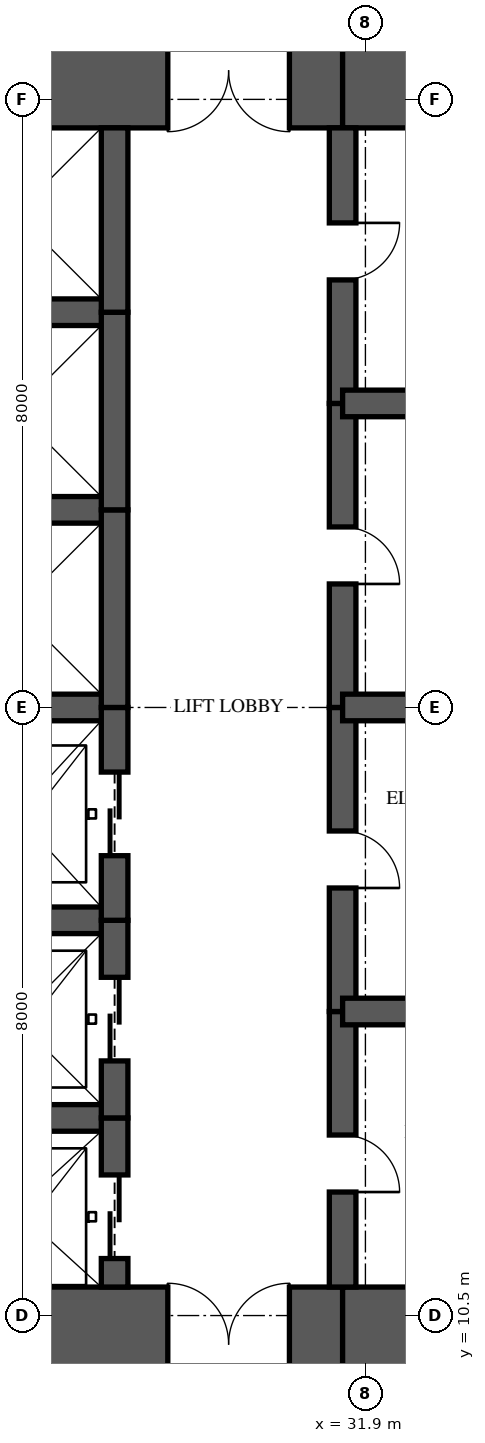
"""IFC4 building model, lengths in metres.
Left out: names, types, materials, properties, quantities, classifications, styles, units other than length and angle.
Written with IfcOpenShell. Run it as: python <this file> out.ifc"""

import sys

from ifc_helpers import new_model, si_unit, direction, frame, frame_2d, origin, place, context, subcontext, project, spatial, rectangle, extrude, element, fill, save


model = new_model("IFC4")
c1 = context("Model", 3, precision=1e-05, world=origin(), true_north=direction((0.0, 1.0)))
c2 = subcontext(c1, "Body", "Model", "MODEL_VIEW")
j1 = project(units=[si_unit("LENGTHUNIT", "METRE"), si_unit("PLANEANGLEUNIT", "RADIAN")], contexts=[c1])
p1 = place(None, origin())
s1 = spatial("IfcSite", under=j1, at=p1, CompositionType="ELEMENT")
p2 = place(p1, origin())
s2 = spatial("IfcBuilding", under=s1, at=p2, CompositionType="ELEMENT")
p3 = place(p2, frame((0.0, 0.0, 131.65)))
s3 = spatial("IfcBuildingStorey", under=s2, at=p3, CompositionType="ELEMENT", Elevation=131.65)
p4 = place(p3, frame((26.0, 10.125, 0.0), z_axis=(0.0, 0.0, 1.0), x_axis=(1.0, 0.0, 0.0)))
e1 = element("IfcWall", 1, at=p4, inside=s3, PredefinedType="SHEAR", context=c2, shape_type="SweptSolid", body=[
    extrude(rectangle(XDim=5.6, YDim=1.5, at=frame_2d((2.8, 0.0))), origin(), (0.0, 0.0, 1.0), 3.35),
])
p5 = place(p4, frame((3.3, 0.0, 0.0)))
e2 = element("IfcOpeningElement", 2, at=p5, cuts=e1, PredefinedType="OPENING", context=c2, shape_type="SweptSolid", body=[
    extrude(rectangle(XDim=1.6, YDim=2.1, at=frame_2d((0.8, 1.05))), frame((0.0, 0.76, 0.0), z_axis=(0.0, -1.0, 0.0), x_axis=(1.0, 0.0, 0.0)), (0.0, 0.0, 1.0), 1.52),
])
for number, where, z_axis, x_axis in (
    (3, (31.6, 10.125, 0.0), (0.0, 0.0, 1.0), (1.0, 0.0, 0.0)),
    (4, (35.9, 26.875, 0.0), (0.0, 0.0, 1.0), (-1.0, 0.0, 0.0)),
):
    element("IfcWall", number, at=place(p3, frame(where, z_axis=z_axis, x_axis=x_axis)), inside=s3, PredefinedType="SHEAR", context=c2, shape_type="SweptSolid", body=[
        extrude(rectangle(XDim=4.3, YDim=1.5, at=frame_2d((2.15, 0.0))), origin(), (0.0, 0.0, 1.0), 3.35),
    ])
p6 = place(p3, frame((31.6, 26.875, 0.0), z_axis=(0.0, 0.0, 1.0), x_axis=(-1.0, 0.0, 0.0)))
e5 = element("IfcWall", 5, at=p6, inside=s3, PredefinedType="SHEAR", context=c2, shape_type="SweptSolid", body=[
    extrude(rectangle(XDim=5.6, YDim=1.5, at=frame_2d((2.8, 0.0))), origin(), (0.0, 0.0, 1.0), 3.35),
])
p7 = place(p6, frame((0.7, 0.0, 0.0)))
e6 = element("IfcOpeningElement", 6, at=p7, cuts=e5, PredefinedType="OPENING", context=c2, shape_type="SweptSolid", body=[
    extrude(rectangle(XDim=1.6, YDim=2.1, at=frame_2d((0.8, 1.05))), frame((0.0, 0.76, 0.0), z_axis=(0.0, -1.0, 0.0), x_axis=(1.0, 0.0, 0.0)), (0.0, 0.0, 1.0), 1.52),
])
p8 = place(p3, frame((28.6, 10.875, 0.0), z_axis=(0.0, 0.0, 1.0), x_axis=(0.0, 1.0, 0.0)))
e7 = element("IfcWall", 7, at=p8, inside=s3, PredefinedType="SHEAR", context=c2, shape_type="SweptSolid", body=[
    extrude(rectangle(XDim=2.225, YDim=0.35, at=frame_2d((1.113, 0.0))), origin(), (0.0, 0.0, 1.0), 3.35),
])
p9 = place(p8, frame((0.375, 0.0, 0.0)))
e8 = element("IfcOpeningElement", 8, at=p9, cuts=e7, PredefinedType="OPENING", context=c2, shape_type="SweptSolid", body=[
    extrude(rectangle(XDim=1.1, YDim=2.1, at=frame_2d((0.55, 1.05))), frame((0.0, 0.185, 0.0), z_axis=(0.0, -1.0, 0.0), x_axis=(1.0, 0.0, 0.0)), (0.0, 0.0, 1.0), 0.37),
])
p10 = place(p3, frame((28.6, 13.1, 0.0), z_axis=(0.0, 0.0, 1.0), x_axis=(0.0, 1.0, 0.0)))
e9 = element("IfcWall", 9, at=p10, inside=s3, PredefinedType="SHEAR", context=c2, shape_type="SweptSolid", body=[
    extrude(rectangle(XDim=2.6, YDim=0.35, at=frame_2d((1.3, 0.0))), origin(), (0.0, 0.0, 1.0), 3.35),
])
p11 = place(p10, frame((0.75, 0.0, 0.0)))
e10 = element("IfcOpeningElement", 10, at=p11, cuts=e9, PredefinedType="OPENING", context=c2, shape_type="SweptSolid", body=[
    extrude(rectangle(XDim=1.1, YDim=2.1, at=frame_2d((0.55, 1.05))), frame((0.0, 0.185, 0.0), z_axis=(0.0, -1.0, 0.0), x_axis=(1.0, 0.0, 0.0)), (0.0, 0.0, 1.0), 0.37),
])
p12 = place(p3, frame((28.6, 15.7, 0.0), z_axis=(0.0, 0.0, 1.0), x_axis=(0.0, 1.0, 0.0)))
e11 = element("IfcWall", 11, at=p12, inside=s3, PredefinedType="SHEAR", context=c2, shape_type="SweptSolid", body=[
    extrude(rectangle(XDim=2.8, YDim=0.35, at=frame_2d((1.4, 0.0))), origin(), (0.0, 0.0, 1.0), 3.35),
])
p13 = place(p12, frame((0.85, 0.0, 0.0)))
e12 = element("IfcOpeningElement", 12, at=p13, cuts=e11, PredefinedType="OPENING", context=c2, shape_type="SweptSolid", body=[
    extrude(rectangle(XDim=1.1, YDim=2.1, at=frame_2d((0.55, 1.05))), frame((0.0, 0.185, 0.0), z_axis=(0.0, -1.0, 0.0), x_axis=(1.0, 0.0, 0.0)), (0.0, 0.0, 1.0), 0.37),
])
p14 = place(p3, frame((28.6, 18.5, 0.0), z_axis=(0.0, 0.0, 1.0), x_axis=(0.0, 1.0, 0.0)))
e13 = element("IfcWall", 13, at=p14, inside=s3, PredefinedType="SHEAR", context=c2, shape_type="SweptSolid", body=[
    extrude(rectangle(XDim=2.6, YDim=0.35, at=frame_2d((1.3, 0.0))), origin(), (0.0, 0.0, 1.0), 3.35),
])
p15 = place(p3, frame((28.6, 21.1, 0.0), z_axis=(0.0, 0.0, 1.0), x_axis=(0.0, 1.0, 0.0)))
e14 = element("IfcWall", 14, at=p15, inside=s3, PredefinedType="SHEAR", context=c2, shape_type="SweptSolid", body=[
    extrude(rectangle(XDim=2.6, YDim=0.35, at=frame_2d((1.3, 0.0))), origin(), (0.0, 0.0, 1.0), 3.35),
])
p16 = place(p3, frame((28.6, 23.7, 0.0), z_axis=(0.0, 0.0, 1.0), x_axis=(0.0, 1.0, 0.0)))
e15 = element("IfcWall", 15, at=p16, inside=s3, PredefinedType="SHEAR", context=c2, shape_type="SweptSolid", body=[
    extrude(rectangle(XDim=2.425, YDim=0.35, at=frame_2d((1.212, 0.0))), origin(), (0.0, 0.0, 1.0), 3.35),
])
p17 = place(p3, frame((31.6, 10.875, 0.0), z_axis=(0.0, 0.0, 1.0), x_axis=(0.0, 1.0, 0.0)))
e16 = element("IfcWall", 16, at=p17, inside=s3, PredefinedType="SHEAR", context=c2, shape_type="SweptSolid", body=[
    extrude(rectangle(XDim=3.625, YDim=0.35, at=frame_2d((1.812, 0.0))), origin(), (0.0, 0.0, 1.0), 3.35),
])
p18 = place(p17, frame((1.25, 0.0, 0.0)))
e17 = element("IfcOpeningElement", 17, at=p18, cuts=e16, PredefinedType="OPENING", context=c2, shape_type="SweptSolid", body=[
    extrude(rectangle(XDim=0.75, YDim=2.1, at=frame_2d((0.375, 1.05))), frame((0.0, 0.185, 0.0), z_axis=(0.0, -1.0, 0.0), x_axis=(1.0, 0.0, 0.0)), (0.0, 0.0, 1.0), 0.37),
])
p19 = place(p3, frame((31.6, 14.5, 0.0), z_axis=(0.0, 0.0, 1.0), x_axis=(0.0, 1.0, 0.0)))
e18 = element("IfcWall", 18, at=p19, inside=s3, PredefinedType="SHEAR", context=c2, shape_type="SweptSolid", body=[
    extrude(rectangle(XDim=4.0, YDim=0.35, at=frame_2d((2.0, 0.0))), origin(), (0.0, 0.0, 1.0), 3.35),
])
p20 = place(p19, frame((1.625, 0.0, 0.0)))
e19 = element("IfcOpeningElement", 19, at=p20, cuts=e18, PredefinedType="OPENING", context=c2, shape_type="SweptSolid", body=[
    extrude(rectangle(XDim=0.75, YDim=2.1, at=frame_2d((0.375, 1.05))), frame((0.0, 0.185, 0.0), z_axis=(0.0, -1.0, 0.0), x_axis=(1.0, 0.0, 0.0)), (0.0, 0.0, 1.0), 0.37),
])
p21 = place(p3, frame((31.6, 18.5, 0.0), z_axis=(0.0, 0.0, 1.0), x_axis=(0.0, 1.0, 0.0)))
e20 = element("IfcWall", 20, at=p21, inside=s3, PredefinedType="SHEAR", context=c2, shape_type="SweptSolid", body=[
    extrude(rectangle(XDim=4.0, YDim=0.35, at=frame_2d((2.0, 0.0))), origin(), (0.0, 0.0, 1.0), 3.35),
])
p22 = place(p21, frame((1.625, 0.0, 0.0)))
e21 = element("IfcOpeningElement", 21, at=p22, cuts=e20, PredefinedType="OPENING", context=c2, shape_type="SweptSolid", body=[
    extrude(rectangle(XDim=0.75, YDim=2.1, at=frame_2d((0.375, 1.05))), frame((0.0, 0.185, 0.0), z_axis=(0.0, -1.0, 0.0), x_axis=(1.0, 0.0, 0.0)), (0.0, 0.0, 1.0), 0.37),
])
p23 = place(p3, frame((31.6, 22.5, 0.0), z_axis=(0.0, 0.0, 1.0), x_axis=(0.0, 1.0, 0.0)))
e22 = element("IfcWall", 22, at=p23, inside=s3, PredefinedType="SHEAR", context=c2, shape_type="SweptSolid", body=[
    extrude(rectangle(XDim=3.625, YDim=0.35, at=frame_2d((1.812, 0.0))), origin(), (0.0, 0.0, 1.0), 3.35),
])
p24 = place(p23, frame((1.625, 0.0, 0.0)))
e23 = element("IfcOpeningElement", 23, at=p24, cuts=e22, PredefinedType="OPENING", context=c2, shape_type="SweptSolid", body=[
    extrude(rectangle(XDim=0.75, YDim=2.1, at=frame_2d((0.375, 1.05))), frame((0.0, 0.185, 0.0), z_axis=(0.0, -1.0, 0.0), x_axis=(1.0, 0.0, 0.0)), (0.0, 0.0, 1.0), 0.37),
])
for number, where, z_axis, x_axis in (
    (24, (26.0, 13.1, 0.0), (0.0, 0.0, 1.0), (1.0, 0.0, 0.0)),
    (25, (26.0, 15.7, 0.0), (0.0, 0.0, 1.0), (1.0, 0.0, 0.0)),
    (26, (26.0, 18.5, 0.0), (0.0, 0.0, 1.0), (1.0, 0.0, 0.0)),
    (27, (26.0, 21.1, 0.0), (0.0, 0.0, 1.0), (1.0, 0.0, 0.0)),
    (28, (26.0, 23.7, 0.0), (0.0, 0.0, 1.0), (1.0, 0.0, 0.0)),
):
    element("IfcWall", number, at=place(p3, frame(where, z_axis=z_axis, x_axis=x_axis)), inside=s3, PredefinedType="SHEAR", context=c2, shape_type="SweptSolid", body=[
        extrude(rectangle(XDim=2.6, YDim=0.35, at=frame_2d((1.3, 0.0))), origin(), (0.0, 0.0, 1.0), 3.35),
    ])
for number, where, z_axis, x_axis in (
    (29, (31.6, 14.5, 0.0), (0.0, 0.0, 1.0), (1.0, 0.0, 0.0)),
    (30, (31.6, 18.5, 0.0), (0.0, 0.0, 1.0), (1.0, 0.0, 0.0)),
    (31, (31.6, 22.5, 0.0), (0.0, 0.0, 1.0), (1.0, 0.0, 0.0)),
):
    element("IfcWall", number, at=place(p3, frame(where, z_axis=z_axis, x_axis=x_axis)), inside=s3, PredefinedType="SHEAR", context=c2, shape_type="SweptSolid", body=[
        extrude(rectangle(XDim=4.3, YDim=0.35, at=frame_2d((2.15, 0.0))), origin(), (0.0, 0.0, 1.0), 3.35),
    ])
p25 = place(p9, origin())
e32 = element("IfcDoor", 32, at=p25, inside=s3, OperationType="SLIDING_TO_LEFT", PredefinedType="DOOR", context=c2, shape_type="SweptSolid", body=[
    extrude(rectangle(XDim=1.1, YDim=2.1, at=frame_2d((0.55, 1.05))), frame((0.0, 0.025, 0.0), z_axis=(0.0, -1.0, 0.0), x_axis=(1.0, 0.0, 0.0)), (0.0, 0.0, 1.0), 0.05),
])
fill(e8, e32)
p26 = place(p11, origin())
e33 = element("IfcDoor", 33, at=p26, inside=s3, OperationType="SLIDING_TO_LEFT", PredefinedType="DOOR", context=c2, shape_type="SweptSolid", body=[
    extrude(rectangle(XDim=1.1, YDim=2.1, at=frame_2d((0.55, 1.05))), frame((0.0, 0.025, 0.0), z_axis=(0.0, -1.0, 0.0), x_axis=(1.0, 0.0, 0.0)), (0.0, 0.0, 1.0), 0.05),
])
fill(e10, e33)
p27 = place(p13, origin())
e34 = element("IfcDoor", 34, at=p27, inside=s3, OperationType="SLIDING_TO_LEFT", PredefinedType="DOOR", context=c2, shape_type="SweptSolid", body=[
    extrude(rectangle(XDim=1.1, YDim=2.1, at=frame_2d((0.55, 1.05))), frame((0.0, 0.025, 0.0), z_axis=(0.0, -1.0, 0.0), x_axis=(1.0, 0.0, 0.0)), (0.0, 0.0, 1.0), 0.05),
])
fill(e12, e34)
p28 = place(p5, origin())
e35 = element("IfcDoor", 35, at=p28, inside=s3, OperationType="DOUBLE_DOOR_SINGLE_SWING", PredefinedType="DOOR", context=c2, shape_type="SweptSolid", body=[
    extrude(rectangle(XDim=1.6, YDim=2.1, at=frame_2d((0.8, 1.05))), frame((0.0, 0.025, 0.0), z_axis=(0.0, -1.0, 0.0), x_axis=(1.0, 0.0, 0.0)), (0.0, 0.0, 1.0), 0.05),
])
fill(e2, e35)
p29 = place(p7, origin())
e36 = element("IfcDoor", 36, at=p29, inside=s3, OperationType="DOUBLE_DOOR_SINGLE_SWING", PredefinedType="DOOR", context=c2, shape_type="SweptSolid", body=[
    extrude(rectangle(XDim=1.6, YDim=2.1, at=frame_2d((0.8, 1.05))), frame((0.0, 0.025, 0.0), z_axis=(0.0, -1.0, 0.0), x_axis=(1.0, 0.0, 0.0)), (0.0, 0.0, 1.0), 0.05),
])
fill(e6, e36)
p30 = place(p18, frame((0.75, 0.0, 0.0), z_axis=(0.0, 0.0, 1.0), x_axis=(-1.0, 0.0, 0.0)))
e37 = element("IfcDoor", 37, at=p30, inside=s3, OperationType="SINGLE_SWING_RIGHT", PredefinedType="DOOR", context=c2, shape_type="SweptSolid", body=[
    extrude(rectangle(XDim=0.75, YDim=2.1, at=frame_2d((0.375, 1.05))), frame((0.0, 0.025, 0.0), z_axis=(0.0, -1.0, 0.0), x_axis=(1.0, 0.0, 0.0)), (0.0, 0.0, 1.0), 0.05),
])
fill(e17, e37)
p31 = place(p20, frame((0.75, 0.0, 0.0), z_axis=(0.0, 0.0, 1.0), x_axis=(-1.0, 0.0, 0.0)))
e38 = element("IfcDoor", 38, at=p31, inside=s3, OperationType="SINGLE_SWING_RIGHT", PredefinedType="DOOR", context=c2, shape_type="SweptSolid", body=[
    extrude(rectangle(XDim=0.75, YDim=2.1, at=frame_2d((0.375, 1.05))), frame((0.0, 0.025, 0.0), z_axis=(0.0, -1.0, 0.0), x_axis=(1.0, 0.0, 0.0)), (0.0, 0.0, 1.0), 0.05),
])
fill(e19, e38)
p32 = place(p22, frame((0.75, 0.0, 0.0), z_axis=(0.0, 0.0, 1.0), x_axis=(-1.0, 0.0, 0.0)))
e39 = element("IfcDoor", 39, at=p32, inside=s3, OperationType="SINGLE_SWING_RIGHT", PredefinedType="DOOR", context=c2, shape_type="SweptSolid", body=[
    extrude(rectangle(XDim=0.75, YDim=2.1, at=frame_2d((0.375, 1.05))), frame((0.0, 0.025, 0.0), z_axis=(0.0, -1.0, 0.0), x_axis=(1.0, 0.0, 0.0)), (0.0, 0.0, 1.0), 0.05),
])
fill(e21, e39)
p33 = place(p24, frame((0.75, 0.0, 0.0), z_axis=(0.0, 0.0, 1.0), x_axis=(-1.0, 0.0, 0.0)))
e40 = element("IfcDoor", 40, at=p33, inside=s3, OperationType="SINGLE_SWING_LEFT", PredefinedType="DOOR", context=c2, shape_type="SweptSolid", body=[
    extrude(rectangle(XDim=0.75, YDim=2.1, at=frame_2d((0.375, 1.05))), frame((0.0, 0.025, 0.0), z_axis=(0.0, -1.0, 0.0), x_axis=(1.0, 0.0, 0.0)), (0.0, 0.0, 1.0), 0.05),
])
fill(e23, e40)
save(model, sys.argv[1])
